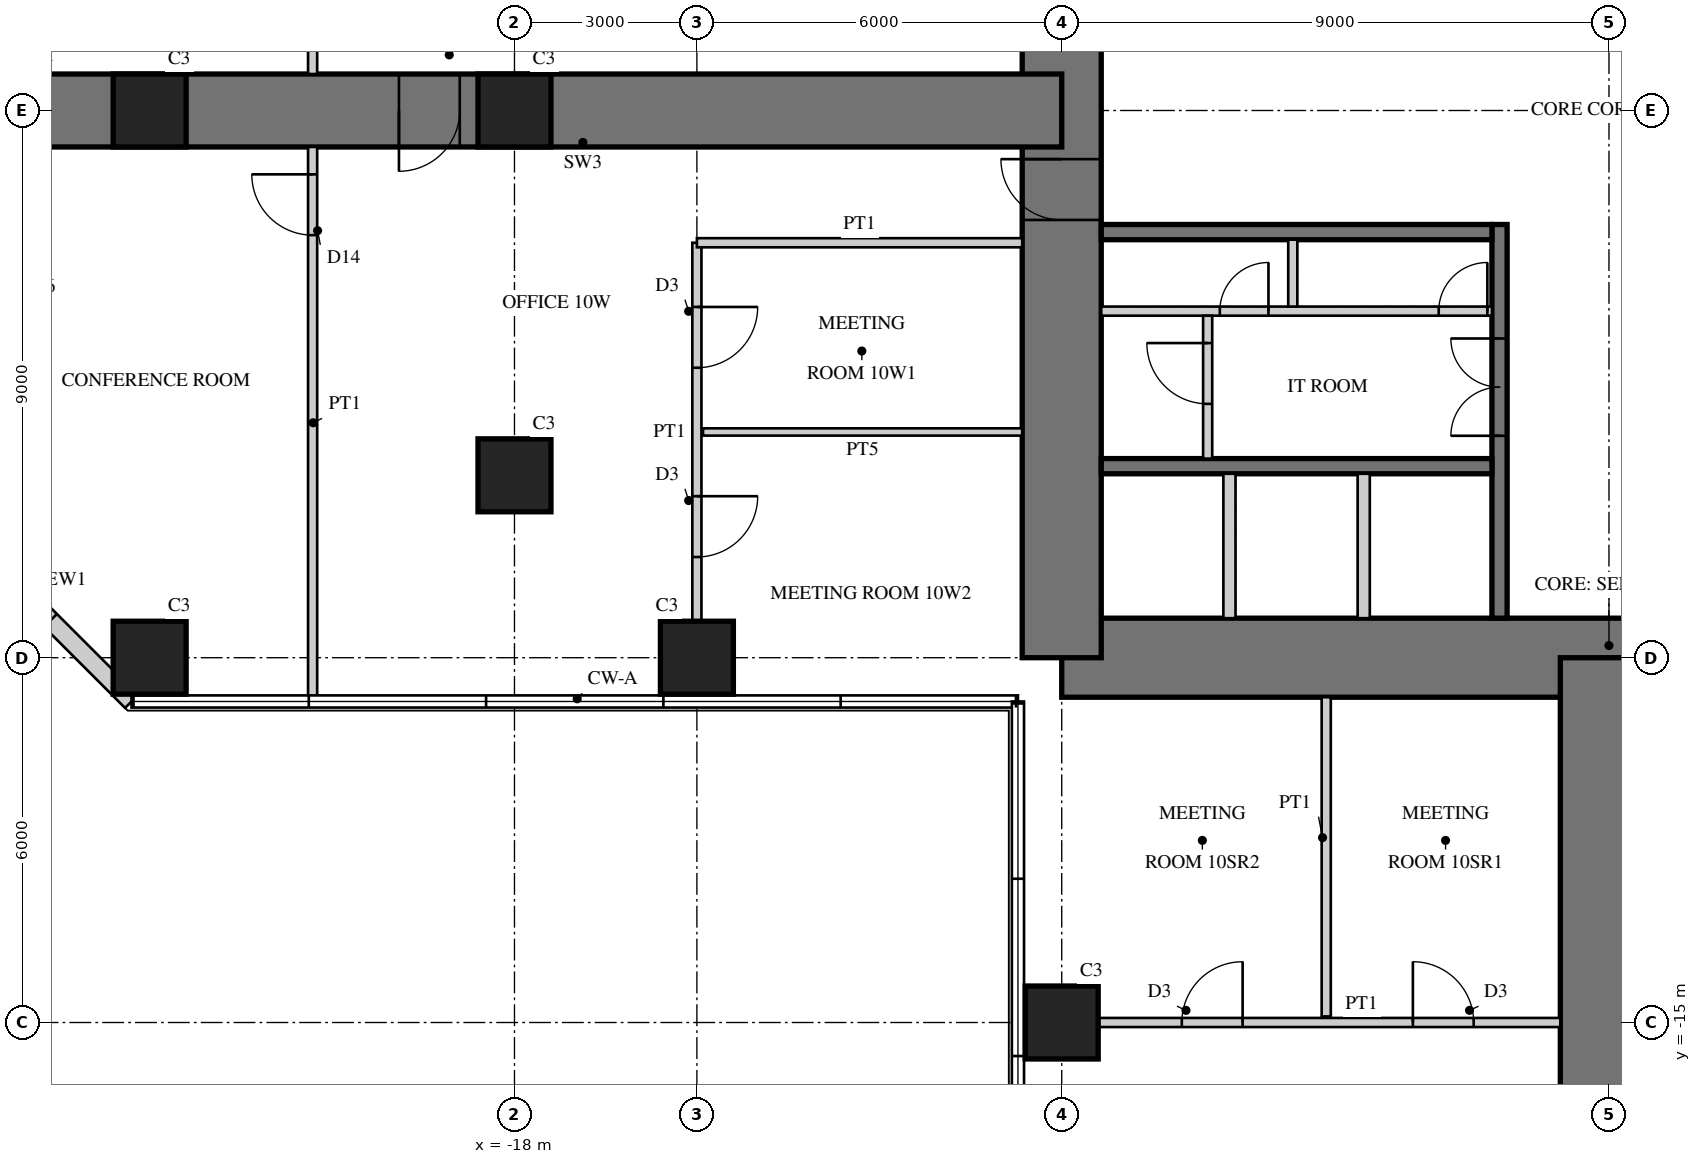
"""IFC4 building model, lengths in metres.
Left out: names, types, materials, properties, quantities, classifications, styles, units other than length and angle.
Written with IfcOpenShell. Run it as: python <this file> out.ifc"""

import sys

from ifc_helpers import new_model, si_unit, direction, frame, frame_2d, origin, origin_2d, place, context, subcontext, project, spatial, rectangle, extrude, element, fill, save


model = new_model("IFC4")
c1 = context("Model", 3, precision=1e-05, world=origin(), true_north=direction((0.0, 1.0)))
c2 = subcontext(c1, "Body", "Model", "MODEL_VIEW")
j1 = project(units=[si_unit("LENGTHUNIT", "METRE"), si_unit("PLANEANGLEUNIT", "RADIAN")], contexts=[c1])
p1 = place(None, origin())
s1 = spatial("IfcSite", under=j1, at=p1, CompositionType="ELEMENT")
p2 = place(p1, origin())
s2 = spatial("IfcBuilding", under=s1, at=p2, CompositionType="ELEMENT")
p3 = place(p2, frame((0.0, 0.0, 43.5)))
s3 = spatial("IfcBuildingStorey", under=s2, at=p3, CompositionType="ELEMENT", Elevation=43.5)
p4 = place(p3, frame((-9.0, -9.0, 0.0), z_axis=(0.0, 0.0, 1.0), x_axis=(1.0, 0.0, 0.0)))
e1 = element("IfcWall", 1, at=p4, inside=s3, PredefinedType="SHEAR", context=c2, shape_type="SweptSolid", body=[
    extrude(rectangle(XDim=18.0, YDim=1.3, at=frame_2d((9.0, 0.0))), origin(), (0.0, 0.0, 1.0), 4.0),
])
p5 = place(p4, frame((9.8, 0.0, 0.0)))
e2 = element("IfcOpeningElement", 2, at=p5, cuts=e1, PredefinedType="OPENING", context=c2, shape_type="SweptSolid", body=[
    extrude(rectangle(XDim=1.0, YDim=2.4, at=frame_2d((0.5, 1.2))), frame((0.0, 0.66, 0.0), z_axis=(0.0, -1.0, 0.0), x_axis=(1.0, 0.0, 0.0)), (0.0, 0.0, 1.0), 1.32),
])
p6 = place(p3, frame((-9.0, 9.0, 0.0), z_axis=(0.0, 0.0, 1.0), x_axis=(0.0, -1.0, 0.0)))
e3 = element("IfcWall", 3, at=p6, inside=s3, PredefinedType="SHEAR", context=c2, shape_type="SweptSolid", body=[
    extrude(rectangle(XDim=18.0, YDim=1.3, at=frame_2d((9.0, 0.0))), origin(), (0.0, 0.0, 1.0), 4.0),
])
p7 = place(p6, frame((9.8, 0.0, 0.0)))
e4 = element("IfcOpeningElement", 4, at=p7, cuts=e3, PredefinedType="OPENING", context=c2, shape_type="SweptSolid", body=[
    extrude(rectangle(XDim=1.0, YDim=2.4, at=frame_2d((0.5, 1.2))), frame((0.0, 0.66, 0.0), z_axis=(0.0, -1.0, 0.0), x_axis=(1.0, 0.0, 0.0)), (0.0, 0.0, 1.0), 1.32),
])
p8 = place(p3, frame((-1.8, -1.875, 0.0), z_axis=(0.0, 0.0, 1.0), x_axis=(0.0, -1.0, 0.0)))
e5 = element("IfcWall", 5, at=p8, inside=s3, PredefinedType="SHEAR", context=c2, shape_type="SweptSolid", body=[
    extrude(rectangle(XDim=6.475, YDim=0.25, at=frame_2d((3.238, 0.0))), origin(), (0.0, 0.0, 1.0), 4.0),
])
p9 = place(p8, frame((1.875, 0.0, 0.0)))
e6 = element("IfcOpeningElement", 6, at=p9, cuts=e5, PredefinedType="OPENING", context=c2, shape_type="SweptSolid", body=[
    extrude(rectangle(XDim=1.6, YDim=2.4, at=frame_2d((0.8, 1.2))), frame((0.0, 0.135, 0.0), z_axis=(0.0, -1.0, 0.0), x_axis=(1.0, 0.0, 0.0)), (0.0, 0.0, 1.0), 0.27),
])
for number, where, z_axis, x_axis in (
    (7, (-1.925, -2.0, 0.0), (0.0, 0.0, 1.0), (-1.0, 0.0, 0.0)),
    (8, (-1.925, -5.85, 0.0), (0.0, 0.0, 1.0), (-1.0, 0.0, 0.0)),
):
    element("IfcWall", number, at=place(p3, frame(where, z_axis=z_axis, x_axis=x_axis)), inside=s3, PredefinedType="SHEAR", context=c2, shape_type="SweptSolid", body=[
        extrude(rectangle(XDim=6.425, YDim=0.25, at=frame_2d((3.212, 0.0))), origin(), (0.0, 0.0, 1.0), 4.0),
    ])
p10 = place(p3, frame((-1.925, -3.3, 0.0), z_axis=(0.0, 0.0, 1.0), x_axis=(-1.0, 0.0, 0.0)))
e9 = element("IfcWall", 9, at=p10, inside=s3, PredefinedType="PARTITIONING", context=c2, shape_type="SweptSolid", body=[
    extrude(rectangle(XDim=6.425, YDim=0.15, at=frame_2d((3.212, 0.0))), origin(), (0.0, 0.0, 1.0), 4.0),
])
p11 = place(p10, frame((0.075, 0.0, 0.0)))
e10 = element("IfcOpeningElement", 10, at=p11, cuts=e9, PredefinedType="OPENING", context=c2, shape_type="SweptSolid", body=[
    extrude(rectangle(XDim=0.8, YDim=2.1, at=frame_2d((0.4, 1.05))), frame((0.0, 0.085, 0.0), z_axis=(0.0, -1.0, 0.0), x_axis=(1.0, 0.0, 0.0)), (0.0, 0.0, 1.0), 0.17),
])
p12 = place(p10, frame((3.675, 0.0, 0.0)))
e11 = element("IfcOpeningElement", 11, at=p12, cuts=e9, PredefinedType="OPENING", context=c2, shape_type="SweptSolid", body=[
    extrude(rectangle(XDim=0.8, YDim=2.1, at=frame_2d((0.4, 1.05))), frame((0.0, 0.085, 0.0), z_axis=(0.0, -1.0, 0.0), x_axis=(1.0, 0.0, 0.0)), (0.0, 0.0, 1.0), 0.17),
])
p13 = place(p3, frame((-5.2, -2.125, 0.0), z_axis=(0.0, 0.0, 1.0), x_axis=(0.0, -1.0, 0.0)))
e12 = element("IfcWall", 12, at=p13, inside=s3, PredefinedType="PARTITIONING", context=c2, shape_type="SweptSolid", body=[
    extrude(rectangle(XDim=1.1, YDim=0.15, at=frame_2d((0.55, 0.0))), origin(), (0.0, 0.0, 1.0), 4.0),
])
for number, where, z_axis, x_axis in (
    (13, (-4.033, -5.975, 0.0), (0.0, 0.0, 1.0), (0.0, -1.0, 0.0)),
    (14, (-6.242, -5.975, 0.0), (0.0, 0.0, 1.0), (0.0, -1.0, 0.0)),
):
    element("IfcWall", number, at=place(p3, frame(where, z_axis=z_axis, x_axis=x_axis)), inside=s3, PredefinedType="PARTITIONING", context=c2, shape_type="SweptSolid", body=[
        extrude(rectangle(XDim=2.375, YDim=0.2, at=frame_2d((1.188, 0.0))), origin(), (0.0, 0.0, 1.0), 4.0),
    ])
p14 = place(p3, frame((0.0, -9.0, 0.0), z_axis=(0.0, 0.0, 1.0), x_axis=(0.0, -1.0, 0.0)))
e15 = element("IfcWall", 15, at=p14, inside=s3, PredefinedType="SHEAR", context=c2, shape_type="SweptSolid", body=[
    extrude(rectangle(XDim=18.0, YDim=1.6, at=frame_2d((9.0, 0.0))), origin(), (0.0, 0.0, 1.0), 4.0),
])
p15 = place(p14, frame((9.9, 0.0, 0.0)))
e16 = element("IfcOpeningElement", 16, at=p15, cuts=e15, PredefinedType="OPENING", context=c2, shape_type="SweptSolid", body=[
    extrude(rectangle(XDim=1.0, YDim=2.2, at=frame_2d((0.5, 1.1))), frame((0.0, 0.81, 0.0), z_axis=(0.0, -1.0, 0.0), x_axis=(1.0, 0.0, 0.0)), (0.0, 0.0, 1.0), 1.62),
])
p16 = place(p3, frame((-9.0, 0.0, 0.0), z_axis=(0.0, 0.0, 1.0), x_axis=(-1.0, 0.0, 0.0)))
e17 = element("IfcWall", 17, at=p16, inside=s3, PredefinedType="SHEAR", context=c2, shape_type="SweptSolid", body=[
    extrude(rectangle(XDim=18.0, YDim=1.2, at=frame_2d((9.0, 0.0))), origin(), (0.0, 0.0, 1.0), 4.0),
])
p17 = place(p16, frame((9.9, 0.0, 0.0)))
e18 = element("IfcOpeningElement", 18, at=p17, cuts=e17, PredefinedType="OPENING", context=c2, shape_type="SweptSolid", body=[
    extrude(rectangle(XDim=1.0, YDim=2.2, at=frame_2d((0.5, 1.1))), frame((0.0, 0.61, 0.0), z_axis=(0.0, -1.0, 0.0), x_axis=(1.0, 0.0, 0.0)), (0.0, 0.0, 1.0), 1.22),
])
for number, where, z_axis, x_axis in (
    (19, (-9.0, -15.0, 0.0), (0.0, 0.0, 1.0), (1.0, 0.0, 0.0)),
    (20, (-15.0, -9.0, 0.0), (0.0, 0.0, 1.0), (1.0, 0.0, 0.0)),
    (21, (-24.0, -9.0, 0.0), (0.0, 0.0, 1.0), (1.0, 0.0, 0.0)),
    (22, (-18.0, 0.0, 0.0), (0.0, 0.0, 1.0), (1.0, 0.0, 0.0)),
    (23, (-18.0, -6.0, 0.0), (0.0, 0.0, 1.0), (1.0, 0.0, 0.0)),
    (24, (-24.0, 0.0, 0.0), (0.0, 0.0, 1.0), (1.0, 0.0, 0.0)),
):
    element("IfcColumn", number, at=place(p3, frame(where, z_axis=z_axis, x_axis=x_axis)), inside=s3, PredefinedType="COLUMN", context=c2, shape_type="SweptSolid", body=[
        extrude(rectangle(XDim=1.2, YDim=1.2, at=origin_2d()), origin(), (0.0, 0.0, 1.0), 4.0),
    ])
p18 = place(p3, frame((-27.6, -6.418, 0.0), z_axis=(0.0, 0.0, 1.0), x_axis=(0.707106781187, -0.707106781187, 0.0)))
e25 = element("IfcWall", 25, at=p18, inside=s3, PredefinedType="SOLIDWALL", context=c2, shape_type="SweptSolid", body=[
    extrude(rectangle(XDim=4.669, YDim=0.3, at=frame_2d((2.335, 0.0))), origin(), (0.0, 0.0, 1.0), 3.8),
])
p19 = place(p18, frame((1.885, 0.0, 0.3)))
e26 = element("IfcOpeningElement", 26, at=p19, cuts=e25, PredefinedType="OPENING", context=c2, shape_type="SweptSolid", body=[
    extrude(rectangle(XDim=0.9, YDim=2.4, at=frame_2d((0.45, 1.2))), frame((0.0, 0.16, 0.0), z_axis=(0.0, -1.0, 0.0), x_axis=(1.0, 0.0, 0.0)), (0.0, 0.0, 1.0), 0.32),
])
p20 = place(p3, frame((-6.6, -3.375, 0.0), z_axis=(0.0, 0.0, 1.0), x_axis=(0.0, -1.0, 0.0)))
e27 = element("IfcWall", 27, at=p20, inside=s3, PredefinedType="PARTITIONING", context=c2, shape_type="SweptSolid", body=[
    extrude(rectangle(XDim=2.35, YDim=0.15, at=frame_2d((1.175, 0.0))), origin(), (0.0, 0.0, 1.0), 3.8),
])
p21 = place(p20, frame((0.45, 0.0, 0.0)))
e28 = element("IfcOpeningElement", 28, at=p21, cuts=e27, PredefinedType="OPENING", context=c2, shape_type="SweptSolid", body=[
    extrude(rectangle(XDim=1.0, YDim=2.1, at=frame_2d((0.5, 1.05))), frame((0.0, 0.085, 0.0), z_axis=(0.0, -1.0, 0.0), x_axis=(1.0, 0.0, 0.0)), (0.0, 0.0, 1.0), 0.17),
])
p22 = place(p3, frame((-8.4, -15.0, 0.0), z_axis=(0.0, 0.0, 1.0), x_axis=(1.0, 0.0, 0.0)))
e29 = element("IfcWall", 29, at=p22, inside=s3, PredefinedType="PARTITIONING", context=c2, shape_type="SweptSolid", body=[
    extrude(rectangle(XDim=7.6, YDim=0.15, at=frame_2d((3.8, 0.0))), origin(), (0.0, 0.0, 1.0), 2.95),
])
p23 = place(p22, frame((1.375, 0.0, 0.0)))
e30 = element("IfcOpeningElement", 30, at=p23, cuts=e29, PredefinedType="OPENING", context=c2, shape_type="SweptSolid", body=[
    extrude(rectangle(XDim=1.0, YDim=2.1, at=frame_2d((0.5, 1.05))), frame((0.0, 0.085, 0.0), z_axis=(0.0, -1.0, 0.0), x_axis=(1.0, 0.0, 0.0)), (0.0, 0.0, 1.0), 0.17),
])
p24 = place(p22, frame((5.175, 0.0, 0.0)))
e31 = element("IfcOpeningElement", 31, at=p24, cuts=e29, PredefinedType="OPENING", context=c2, shape_type="SweptSolid", body=[
    extrude(rectangle(XDim=1.0, YDim=2.1, at=frame_2d((0.5, 1.05))), frame((0.0, 0.085, 0.0), z_axis=(0.0, -1.0, 0.0), x_axis=(1.0, 0.0, 0.0)), (0.0, 0.0, 1.0), 0.17),
])
p25 = place(p3, frame((-4.65, -9.65, 0.0), z_axis=(0.0, 0.0, 1.0), x_axis=(0.0, -1.0, 0.0)))
e32 = element("IfcWall", 32, at=p25, inside=s3, PredefinedType="PARTITIONING", context=c2, shape_type="SweptSolid", body=[
    extrude(rectangle(XDim=5.25, YDim=0.15, at=frame_2d((2.625, 0.0))), origin(), (0.0, 0.0, 1.0), 3.8),
])
p26 = place(p3, frame((-15.0, -2.175, 0.0), z_axis=(0.0, 0.0, 1.0), x_axis=(0.0, -1.0, 0.0)))
e33 = element("IfcWall", 33, at=p26, inside=s3, PredefinedType="PARTITIONING", context=c2, shape_type="SweptSolid", body=[
    extrude(rectangle(XDim=6.225, YDim=0.15, at=frame_2d((3.112, 0.0))), origin(), (0.0, 0.0, 1.0), 2.95),
])
p27 = place(p26, frame((1.056, 0.0, 0.0)))
e34 = element("IfcOpeningElement", 34, at=p27, cuts=e33, PredefinedType="OPENING", context=c2, shape_type="SweptSolid", body=[
    extrude(rectangle(XDim=1.0, YDim=2.1, at=frame_2d((0.5, 1.05))), frame((0.0, 0.085, 0.0), z_axis=(0.0, -1.0, 0.0), x_axis=(1.0, 0.0, 0.0)), (0.0, 0.0, 1.0), 0.17),
])
p28 = place(p26, frame((4.169, 0.0, 0.0)))
e35 = element("IfcOpeningElement", 35, at=p28, cuts=e33, PredefinedType="OPENING", context=c2, shape_type="SweptSolid", body=[
    extrude(rectangle(XDim=1.0, YDim=2.1, at=frame_2d((0.5, 1.05))), frame((0.0, 0.085, 0.0), z_axis=(0.0, -1.0, 0.0), x_axis=(1.0, 0.0, 0.0)), (0.0, 0.0, 1.0), 0.17),
])
p29 = place(p3, frame((-9.65, -2.175, 0.0), z_axis=(0.0, 0.0, 1.0), x_axis=(-1.0, 0.0, 0.0)))
e36 = element("IfcWall", 36, at=p29, inside=s3, PredefinedType="PARTITIONING", context=c2, shape_type="SweptSolid", body=[
    extrude(rectangle(XDim=5.35, YDim=0.15, at=frame_2d((2.675, 0.0))), origin(), (0.0, 0.0, 1.0), 3.8),
])
p30 = place(p3, frame((-9.65, -5.288, 0.0), z_axis=(0.0, 0.0, 1.0), x_axis=(-1.0, 0.0, 0.0)))
e37 = element("IfcWall", 37, at=p30, inside=s3, PredefinedType="PLUMBINGWALL", context=c2, shape_type="SweptSolid", body=[
    extrude(rectangle(XDim=5.25, YDim=0.12, at=frame_2d((2.625, 0.0))), origin(), (0.0, 0.0, 1.0), 3.8),
])
p31 = place(p3, frame((-21.32, -0.6, 0.0), z_axis=(0.0, 0.0, 1.0), x_axis=(0.0, -1.0, 0.0)))
e38 = element("IfcWall", 38, at=p31, inside=s3, PredefinedType="PARTITIONING", context=c2, shape_type="SweptSolid", body=[
    extrude(rectangle(XDim=9.08, YDim=0.15, at=frame_2d((4.54, 0.0))), origin(), (0.0, 0.0, 1.0), 3.8),
])
p32 = place(p31, frame((0.45, 0.0, 0.0)))
e39 = element("IfcOpeningElement", 39, at=p32, cuts=e38, PredefinedType="OPENING", context=c2, shape_type="SweptSolid", body=[
    extrude(rectangle(XDim=1.0, YDim=2.2, at=frame_2d((0.5, 1.1))), frame((0.0, 0.085, 0.0), z_axis=(0.0, -1.0, 0.0), x_axis=(1.0, 0.0, 0.0)), (0.0, 0.0, 1.0), 0.17),
])
p33 = place(p3, frame((-21.32, 9.68, 0.0), z_axis=(0.0, 0.0, 1.0), x_axis=(0.0, -1.0, 0.0)))
e40 = element("IfcWall", 40, at=p33, inside=s3, PredefinedType="PARTITIONING", context=c2, shape_type="SweptSolid", body=[
    extrude(rectangle(XDim=9.08, YDim=0.15, at=frame_2d((4.54, 0.0))), origin(), (0.0, 0.0, 1.0), 3.8),
])
p34 = place(p33, frame((7.63, 0.0, 0.0)))
e41 = element("IfcOpeningElement", 41, at=p34, cuts=e40, PredefinedType="OPENING", context=c2, shape_type="SweptSolid", body=[
    extrude(rectangle(XDim=1.0, YDim=2.2, at=frame_2d((0.5, 1.1))), frame((0.0, 0.085, 0.0), z_axis=(0.0, -1.0, 0.0), x_axis=(1.0, 0.0, 0.0)), (0.0, 0.0, 1.0), 0.17),
])
p35 = place(p21, frame((1.0, 0.0, 0.0), z_axis=(0.0, 0.0, 1.0), x_axis=(-1.0, 0.0, 0.0)))
e42 = element("IfcDoor", 42, at=p35, inside=s3, OperationType="SINGLE_SWING_RIGHT", PredefinedType="DOOR", context=c2, shape_type="SweptSolid", body=[
    extrude(rectangle(XDim=1.0, YDim=2.1, at=frame_2d((0.5, 1.05))), frame((0.0, 0.025, 0.0), z_axis=(0.0, -1.0, 0.0), x_axis=(1.0, 0.0, 0.0)), (0.0, 0.0, 1.0), 0.05),
])
fill(e28, e42)
p36 = place(p23, origin())
e43 = element("IfcDoor", 43, at=p36, inside=s3, OperationType="SINGLE_SWING_RIGHT", PredefinedType="DOOR", context=c2, shape_type="SweptSolid", body=[
    extrude(rectangle(XDim=1.0, YDim=2.1, at=frame_2d((0.5, 1.05))), frame((0.0, 0.025, 0.0), z_axis=(0.0, -1.0, 0.0), x_axis=(1.0, 0.0, 0.0)), (0.0, 0.0, 1.0), 0.05),
])
fill(e30, e43)
p37 = place(p24, origin())
e44 = element("IfcDoor", 44, at=p37, inside=s3, OperationType="SINGLE_SWING_LEFT", PredefinedType="DOOR", context=c2, shape_type="SweptSolid", body=[
    extrude(rectangle(XDim=1.0, YDim=2.1, at=frame_2d((0.5, 1.05))), frame((0.0, 0.025, 0.0), z_axis=(0.0, -1.0, 0.0), x_axis=(1.0, 0.0, 0.0)), (0.0, 0.0, 1.0), 0.05),
])
fill(e31, e44)
p38 = place(p27, origin())
e45 = element("IfcDoor", 45, at=p38, inside=s3, OperationType="SINGLE_SWING_LEFT", PredefinedType="DOOR", context=c2, shape_type="SweptSolid", body=[
    extrude(rectangle(XDim=1.0, YDim=2.1, at=frame_2d((0.5, 1.05))), frame((0.0, 0.025, 0.0), z_axis=(0.0, -1.0, 0.0), x_axis=(1.0, 0.0, 0.0)), (0.0, 0.0, 1.0), 0.05),
])
fill(e34, e45)
p39 = place(p28, origin())
e46 = element("IfcDoor", 46, at=p39, inside=s3, OperationType="SINGLE_SWING_LEFT", PredefinedType="DOOR", context=c2, shape_type="SweptSolid", body=[
    extrude(rectangle(XDim=1.0, YDim=2.1, at=frame_2d((0.5, 1.05))), frame((0.0, 0.025, 0.0), z_axis=(0.0, -1.0, 0.0), x_axis=(1.0, 0.0, 0.0)), (0.0, 0.0, 1.0), 0.05),
])
fill(e35, e46)
p40 = place(p32, frame((1.0, 0.0, 0.0), z_axis=(0.0, 0.0, 1.0), x_axis=(-1.0, 0.0, 0.0)))
e47 = element("IfcDoor", 47, at=p40, inside=s3, OperationType="SINGLE_SWING_RIGHT", PredefinedType="DOOR", context=c2, shape_type="SweptSolid", body=[
    extrude(rectangle(XDim=1.0, YDim=2.2, at=frame_2d((0.5, 1.1))), frame((0.0, 0.025, 0.0), z_axis=(0.0, -1.0, 0.0), x_axis=(1.0, 0.0, 0.0)), (0.0, 0.0, 1.0), 0.05),
])
fill(e39, e47)
p41 = place(p17, origin())
e48 = element("IfcDoor", 48, at=p41, inside=s3, OperationType="SINGLE_SWING_RIGHT", PredefinedType="DOOR", context=c2, shape_type="SweptSolid", body=[
    extrude(rectangle(XDim=1.0, YDim=2.2, at=frame_2d((0.5, 1.1))), frame((0.0, 0.025, 0.0), z_axis=(0.0, -1.0, 0.0), x_axis=(1.0, 0.0, 0.0)), (0.0, 0.0, 1.0), 0.05),
])
fill(e18, e48)
p42 = place(p7, frame((1.0, 0.0, 0.0), z_axis=(0.0, 0.0, 1.0), x_axis=(-1.0, 0.0, 0.0)))
e49 = element("IfcDoor", 49, at=p42, inside=s3, OperationType="SINGLE_SWING_RIGHT", PredefinedType="DOOR", context=c2, shape_type="SweptSolid", body=[
    extrude(rectangle(XDim=1.0, YDim=2.4, at=frame_2d((0.5, 1.2))), frame((0.0, -0.005, 0.0), z_axis=(0.0, -1.0, 0.0), x_axis=(1.0, 0.0, 0.0)), (0.0, 0.0, 1.0), 0.05),
])
fill(e4, e49)
p43 = place(p9, frame((1.6, 0.0, 0.0), z_axis=(0.0, 0.0, 1.0), x_axis=(-1.0, 0.0, 0.0)))
e50 = element("IfcDoor", 50, at=p43, inside=s3, OperationType="DOUBLE_DOOR_SINGLE_SWING", PredefinedType="DOOR", context=c2, shape_type="SweptSolid", body=[
    extrude(rectangle(XDim=1.6, YDim=2.4, at=frame_2d((0.8, 1.2))), frame((0.0, 0.025, 0.0), z_axis=(0.0, -1.0, 0.0), x_axis=(1.0, 0.0, 0.0)), (0.0, 0.0, 1.0), 0.05),
])
fill(e6, e50)
p44 = place(p11, frame((0.8, 0.0, 0.0), z_axis=(0.0, 0.0, 1.0), x_axis=(-1.0, 0.0, 0.0)))
e51 = element("IfcDoor", 51, at=p44, inside=s3, OperationType="SINGLE_SWING_RIGHT", PredefinedType="DOOR", context=c2, shape_type="SweptSolid", body=[
    extrude(rectangle(XDim=0.8, YDim=2.1, at=frame_2d((0.4, 1.05))), frame((0.0, 0.025, 0.0), z_axis=(0.0, -1.0, 0.0), x_axis=(1.0, 0.0, 0.0)), (0.0, 0.0, 1.0), 0.05),
])
fill(e10, e51)
p45 = place(p12, frame((0.8, 0.0, 0.0), z_axis=(0.0, 0.0, 1.0), x_axis=(-1.0, 0.0, 0.0)))
e52 = element("IfcDoor", 52, at=p45, inside=s3, OperationType="SINGLE_SWING_RIGHT", PredefinedType="DOOR", context=c2, shape_type="SweptSolid", body=[
    extrude(rectangle(XDim=0.8, YDim=2.1, at=frame_2d((0.4, 1.05))), frame((0.0, 0.025, 0.0), z_axis=(0.0, -1.0, 0.0), x_axis=(1.0, 0.0, 0.0)), (0.0, 0.0, 1.0), 0.05),
])
fill(e11, e52)
save(model, sys.argv[1])
